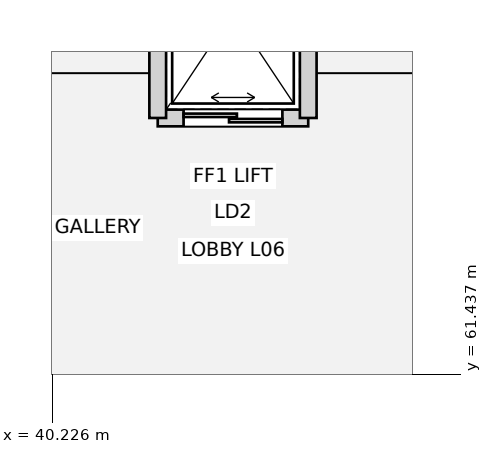
"""IFC4 building model, lengths in metres.
Left out: names, types, materials, properties, quantities, classifications, styles, units other than length and angle.
Written with IfcOpenShell. Run it as: python <this file> out.ifc"""

import sys

from ifc_helpers import new_model, si_unit, direction, frame, frame_2d, origin, place, context, subcontext, project, spatial, rectangle, extrude, element, fill, save


model = new_model("IFC4")
c1 = context("Model", 3, precision=1e-05, world=origin(), true_north=direction((0.0, 1.0)))
c2 = subcontext(c1, "Body", "Model", "MODEL_VIEW")
j1 = project(units=[si_unit("LENGTHUNIT", "METRE"), si_unit("PLANEANGLEUNIT", "RADIAN")], contexts=[c1])
p1 = place(None, origin())
s1 = spatial("IfcSite", under=j1, at=p1, CompositionType="ELEMENT")
p2 = place(p1, origin())
s2 = spatial("IfcBuilding", under=s1, at=p2, CompositionType="ELEMENT")
p3 = place(p2, frame((0.0, 0.0, 30.6)))
s3 = spatial("IfcBuildingStorey", under=s2, at=p3, CompositionType="ELEMENT", Elevation=30.6)
p4 = place(p3, frame((41.61, 64.81, 0.0), z_axis=(0.0, 0.0, 1.0), x_axis=(1.0, 0.0, 0.0)))
e1 = element("IfcWall", 1, at=p4, inside=s3, PredefinedType="PARTITIONING", context=c2, shape_type="SweptSolid", body=[
    extrude(rectangle(XDim=1.98, YDim=0.22, at=frame_2d((0.99, 0.0))), origin(), (0.0, 0.0, 1.0), 3.765),
])
p5 = place(p4, frame((0.34, 0.0, 0.0)))
e2 = element("IfcOpeningElement", 2, at=p5, cuts=e1, PredefinedType="OPENING", context=c2, shape_type="SweptSolid", body=[
    extrude(rectangle(XDim=1.3, YDim=2.2, at=frame_2d((0.65, 1.1))), frame((0.0, 0.12, 0.0), z_axis=(0.0, -1.0, 0.0), x_axis=(1.0, 0.0, 0.0)), (0.0, 0.0, 1.0), 0.24),
])
for number, where, z_axis, x_axis in (
    (3, (41.61, 64.81, 0.0), (0.0, 0.0, 1.0), (0.0, 1.0, 0.0)),
    (4, (43.59, 64.81, 0.0), (0.0, 0.0, 1.0), (0.0, 1.0, 0.0)),
):
    element("IfcWall", number, at=place(p3, frame(where, z_axis=z_axis, x_axis=x_axis)), inside=s3, PredefinedType="PARTITIONING", context=c2, shape_type="SweptSolid", body=[
        extrude(rectangle(XDim=2.78, YDim=0.22, at=frame_2d((1.39, 0.0))), origin(), (0.0, 0.0, 1.0), 2.755),
    ])
p6 = place(p5, origin())
e5 = element("IfcDoor", 5, at=p6, inside=s3, OperationType="DOUBLE_DOOR_SLIDING", PredefinedType="DOOR", context=c2, shape_type="SweptSolid", body=[
    extrude(rectangle(XDim=1.3, YDim=2.2, at=frame_2d((0.65, 1.1))), frame((0.0, 0.025, 0.0), z_axis=(0.0, -1.0, 0.0), x_axis=(1.0, 0.0, 0.0)), (0.0, 0.0, 1.0), 0.05),
])
fill(e2, e5)
save(model, sys.argv[1])
